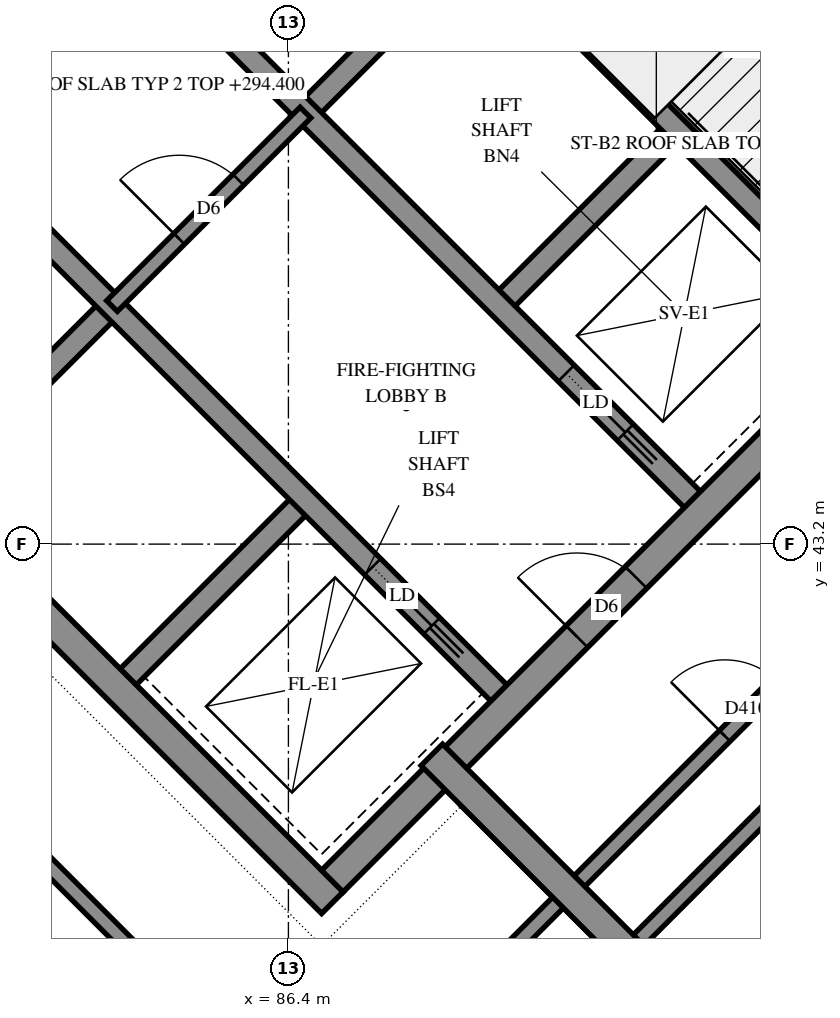
"""IFC4 building model, lengths in metres.
Left out: names, types, materials, properties, quantities, classifications, styles, units other than length and angle.
Written with IfcOpenShell. Run it as: python <this file> out.ifc"""

import sys

from ifc_helpers import new_model, si_unit, direction, frame, frame_2d, origin, place, context, subcontext, project, spatial, polyline, rectangle, outline, extrude, element, fill, save


model = new_model("IFC4")
c1 = context("Model", 3, precision=1e-05, world=origin(), true_north=direction((0.0, 1.0)))
c2 = subcontext(c1, "Body", "Model", "MODEL_VIEW")
j1 = project(units=[si_unit("LENGTHUNIT", "METRE"), si_unit("PLANEANGLEUNIT", "RADIAN")], contexts=[c1])
p1 = place(None, origin())
s1 = spatial("IfcSite", under=j1, at=p1, CompositionType="ELEMENT")
p2 = place(p1, origin())
s2 = spatial("IfcBuilding", under=s1, at=p2, CompositionType="ELEMENT")
p3 = place(p2, frame((0.0, 0.0, 294.4)))
s3 = spatial("IfcBuildingStorey", under=s2, at=p3, CompositionType="ELEMENT", Elevation=294.4)
p4 = place(p3, frame((76.23, 49.231, -0.3), z_axis=(0.0, 0.0, 1.0), x_axis=(0.7071034917, -0.7071100706, 0.0)))
e1 = element("IfcWall", 1, at=p4, inside=s3, PredefinedType="SHEAR", context=c2, shape_type="SweptSolid", body=[
    extrude(outline(polyline([(0.0, 0.0), (15.2, 0.0), (15.2, 3.1), (0.0, 3.1), (0.0, 0.0)])), frame((0.0, 0.2, 0.0), z_axis=(0.0, -1.0, 0.0), x_axis=(1.0, 0.0, 0.0)), (0.0, 0.0, 1.0), 0.4),
])
p5 = place(p3, frame((86.695, 59.696, -0.3), z_axis=(0.0, 0.0, 1.0), x_axis=(0.7071100706, -0.7071034917, 0.0)))
e2 = element("IfcWall", 2, at=p5, inside=s3, PredefinedType="SHEAR", context=c2, shape_type="SweptSolid", body=[
    extrude(outline(polyline([(0.0, 0.0), (15.2, 0.0), (15.2, 3.1), (0.0, 3.1), (0.0, 0.0)])), frame((0.0, 0.2, 0.0), z_axis=(0.0, -1.0, 0.0), x_axis=(1.0, 0.0, 0.0)), (0.0, 0.0, 1.0), 0.4),
])
p6 = place(p5, frame((10.4, 0.0, 0.3)))
e3 = element("IfcOpeningElement", 3, at=p6, cuts=e2, PredefinedType="OPENING", context=c2, shape_type="SweptSolid", body=[
    extrude(rectangle(XDim=0.8, YDim=2.1, at=frame_2d((0.4, 1.05))), frame((0.0, 0.21, 0.0), z_axis=(0.0, -1.0, 0.0), x_axis=(1.0, 0.0, 0.0)), (0.0, 0.0, 1.0), 0.42),
])
p7 = place(p3, frame((76.513, 49.231, -0.3), z_axis=(0.0, 0.0, 1.0), x_axis=(0.7071067812, 0.7071067812, 0.0)))
e4 = element("IfcWall", 4, at=p7, inside=s3, PredefinedType="SHEAR", context=c2, shape_type="SweptSolid", body=[
    extrude(outline(polyline([(0.0, 0.0), (14.4, 0.0), (14.4, 3.1), (0.0, 3.1), (0.0, 0.0)])), frame((0.0, 0.2, 0.0), z_axis=(0.0, -1.0, 0.0), x_axis=(1.0, 0.0, 0.0)), (0.0, 0.0, 1.0), 0.4),
])
p8 = place(p7, frame((4.55, 0.0, 0.3)))
e5 = element("IfcOpeningElement", 5, at=p8, cuts=e4, PredefinedType="OPENING", context=c2, shape_type="SweptSolid", body=[
    extrude(rectangle(XDim=1.1, YDim=2.1, at=frame_2d((0.55, 1.05))), frame((0.0, 0.21, 0.0), z_axis=(0.0, -1.0, 0.0), x_axis=(1.0, 0.0, 0.0)), (0.0, 0.0, 1.0), 0.42),
])
p9 = place(p7, frame((11.35, 0.0, 0.3)))
e6 = element("IfcOpeningElement", 6, at=p9, cuts=e4, PredefinedType="OPENING", context=c2, shape_type="SweptSolid", body=[
    extrude(rectangle(XDim=1.1, YDim=2.1, at=frame_2d((0.55, 1.05))), frame((0.0, 0.21, 0.0), z_axis=(0.0, -1.0, 0.0), x_axis=(1.0, 0.0, 0.0)), (0.0, 0.0, 1.0), 0.42),
])
p10 = place(p3, frame((86.978, 38.766, -0.3), z_axis=(0.0, 0.0, 1.0), x_axis=(0.7071067812, 0.7071067812, 0.0)))
e7 = element("IfcWall", 7, at=p10, inside=s3, PredefinedType="SHEAR", context=c2, shape_type="SweptSolid", body=[
    extrude(outline(polyline([(0.0, 0.0), (14.4, 0.0), (14.4, 3.1), (0.0, 3.1), (0.0, 0.0)])), frame((0.0, 0.2, 0.0), z_axis=(0.0, -1.0, 0.0), x_axis=(1.0, 0.0, 0.0)), (0.0, 0.0, 1.0), 0.4),
])
p11 = place(p10, frame((4.55, 0.0, 0.3)))
e8 = element("IfcOpeningElement", 8, at=p11, cuts=e7, PredefinedType="OPENING", context=c2, shape_type="SweptSolid", body=[
    extrude(rectangle(XDim=1.1, YDim=2.1, at=frame_2d((0.55, 1.05))), frame((0.0, 0.21, 0.0), z_axis=(0.0, -1.0, 0.0), x_axis=(1.0, 0.0, 0.0)), (0.0, 0.0, 1.0), 0.42),
])
p12 = place(p10, frame((11.35, 0.0, 0.3)))
e9 = element("IfcOpeningElement", 9, at=p12, cuts=e7, PredefinedType="OPENING", context=c2, shape_type="SweptSolid", body=[
    extrude(rectangle(XDim=1.1, YDim=2.1, at=frame_2d((0.55, 1.05))), frame((0.0, 0.21, 0.0), z_axis=(0.0, -1.0, 0.0), x_axis=(1.0, 0.0, 0.0)), (0.0, 0.0, 1.0), 0.42),
])
p13 = place(p3, frame((81.746, 43.999, 0.0), z_axis=(0.0, 0.0, 1.0), x_axis=(0.7071067812, 0.7071067812, 0.0)))
e10 = element("IfcWall", 10, at=p13, inside=s3, PredefinedType="SOLIDWALL", context=c2, shape_type="SweptSolid", body=[
    extrude(outline(polyline([(0.0, 0.0), (3.3, 0.0), (3.3, 3.5), (0.0, 3.5), (0.0, 0.0)])), frame((0.0, 0.15, 0.0), z_axis=(0.0, -1.0, 0.0), x_axis=(1.0, 0.0, 0.0)), (0.0, 0.0, 1.0), 0.3),
])
p14 = place(p3, frame((86.625, 48.878, 0.0), z_axis=(0.0, 0.0, 1.0), x_axis=(0.7071067812, 0.7071067812, 0.0)))
e11 = element("IfcWall", 11, at=p14, inside=s3, PredefinedType="SOLIDWALL", context=c2, shape_type="SweptSolid", body=[
    extrude(outline(polyline([(0.0, 0.0), (3.3, 0.0), (3.3, 3.5), (0.0, 3.5), (0.0, 0.0)])), frame((0.0, 0.15, 0.0), z_axis=(0.0, -1.0, 0.0), x_axis=(1.0, 0.0, 0.0)), (0.0, 0.0, 1.0), 0.3),
])
p15 = place(p3, frame((84.291, 41.453, 0.0), z_axis=(0.0, 0.0, 1.0), x_axis=(0.7071067812, 0.7071067812, 0.0)))
e12 = element("IfcWall", 12, at=p15, inside=s3, PredefinedType="SOLIDWALL", context=c2, shape_type="SweptSolid", body=[
    extrude(outline(polyline([(0.0, 0.0), (3.3, 0.0), (3.3, 3.5), (0.0, 3.5), (0.0, 0.0)])), frame((0.0, 0.15, 0.0), z_axis=(0.0, -1.0, 0.0), x_axis=(1.0, 0.0, 0.0)), (0.0, 0.0, 1.0), 0.3),
])
p16 = place(p3, frame((89.17, 46.332, 0.0), z_axis=(0.0, 0.0, 1.0), x_axis=(0.7071067812, 0.7071067812, 0.0)))
e13 = element("IfcWall", 13, at=p16, inside=s3, PredefinedType="SOLIDWALL", context=c2, shape_type="SweptSolid", body=[
    extrude(outline(polyline([(0.0, 0.0), (3.3, 0.0), (3.3, 3.5), (0.0, 3.5), (0.0, 0.0)])), frame((0.0, 0.15, 0.0), z_axis=(0.0, -1.0, 0.0), x_axis=(1.0, 0.0, 0.0)), (0.0, 0.0, 1.0), 0.3),
])
p17 = place(p3, frame((78.988, 51.423, 0.0), z_axis=(0.0, 0.0, 1.0), x_axis=(0.7071067812, -0.7071067812, 0.0)))
e14 = element("IfcWall", 14, at=p17, inside=s3, PredefinedType="SOLIDWALL", context=c2, shape_type="SweptSolid", body=[
    extrude(outline(polyline([(0.0, 0.0), (14.4, 0.0), (14.4, 3.5), (0.0, 3.5), (0.0, 0.0)])), frame((0.0, 0.15, 0.0), z_axis=(0.0, -1.0, 0.0), x_axis=(1.0, 0.0, 0.0)), (0.0, 0.0, 1.0), 0.3),
])
p18 = place(p17, frame((12.05, 0.0, 0.0)))
e15 = element("IfcOpeningElement", 15, at=p18, cuts=e14, PredefinedType="OPENING", context=c2, shape_type="SweptSolid", body=[
    extrude(rectangle(XDim=1.1, YDim=2.1, at=frame_2d((0.55, 1.05))), frame((0.0, 0.16, 0.0), z_axis=(0.0, -1.0, 0.0), x_axis=(1.0, 0.0, 0.0)), (0.0, 0.0, 1.0), 0.32),
])
p19 = place(p3, frame((81.534, 53.969, 0.0), z_axis=(0.0, 0.0, 1.0), x_axis=(0.707103309, -0.7071102534, 0.0)))
e16 = element("IfcWall", 16, at=p19, inside=s3, PredefinedType="SOLIDWALL", context=c2, shape_type="SweptSolid", body=[
    extrude(outline(polyline([(0.0, 0.0), (14.4, 0.0), (14.4, 3.5), (0.0, 3.5), (0.0, 0.0)])), frame((0.0, 0.15, 0.0), z_axis=(0.0, -1.0, 0.0), x_axis=(1.0, 0.0, 0.0)), (0.0, 0.0, 1.0), 0.3),
])
p20 = place(p19, frame((12.05, 0.0, 0.0)))
e17 = element("IfcOpeningElement", 17, at=p20, cuts=e16, PredefinedType="OPENING", context=c2, shape_type="SweptSolid", body=[
    extrude(rectangle(XDim=1.1, YDim=2.1, at=frame_2d((0.55, 1.05))), frame((0.0, 0.16, 0.0), z_axis=(0.0, -1.0, 0.0), x_axis=(1.0, 0.0, 0.0)), (0.0, 0.0, 1.0), 0.32),
])
p21 = place(p3, frame((88.958, 51.211, 0.0), z_axis=(0.0, 0.0, 1.0), x_axis=(0.7070998367, -0.7071137256, 0.0)))
e18 = element("IfcWall", 18, at=p21, inside=s3, PredefinedType="SOLIDWALL", context=c2, shape_type="SweptSolid", body=[
    extrude(outline(polyline([(0.0, 0.0), (7.2, 0.0), (7.2, 3.5), (0.0, 3.5), (0.0, 0.0)])), frame((0.0, 0.15, 0.0), z_axis=(0.0, -1.0, 0.0), x_axis=(1.0, 0.0, 0.0)), (0.0, 0.0, 1.0), 0.3),
])
p22 = place(p3, frame((89.382, 29.856, 0.0), z_axis=(0.0, 0.0, 1.0), x_axis=(0.7071094407, 0.7071041216, 0.0)))
e19 = element("IfcWall", 19, at=p22, inside=s3, PredefinedType="SOLIDWALL", context=c2, shape_type="SweptSolid", body=[
    extrude(outline(polyline([(-0.2, -0.2), (19.0, -0.2), (18.6, 0.2), (0.2, 0.2), (-0.2, -0.2)])), origin(), (0.0, 0.0, 1.0), 3.5),
])
p23 = place(p22, frame((1.9, 0.0, 0.7)))
e20 = element("IfcOpeningElement", 20, at=p23, cuts=e19, PredefinedType="OPENING", context=c2, shape_type="SweptSolid", body=[
    extrude(rectangle(XDim=1.8, YDim=2.2, at=frame_2d((0.9, 1.1))), frame((0.0, 0.21, 0.0), z_axis=(0.0, -1.0, 0.0), x_axis=(1.0, 0.0, 0.0)), (0.0, 0.0, 1.0), 0.42),
])
p24 = place(p22, frame((5.5, 0.0, 0.7)))
e21 = element("IfcOpeningElement", 21, at=p24, cuts=e19, PredefinedType="OPENING", context=c2, shape_type="SweptSolid", body=[
    extrude(rectangle(XDim=1.8, YDim=2.2, at=frame_2d((0.9, 1.1))), frame((0.0, 0.21, 0.0), z_axis=(0.0, -1.0, 0.0), x_axis=(1.0, 0.0, 0.0)), (0.0, 0.0, 1.0), 0.42),
])
p25 = place(p22, frame((8.8, 0.0, 0.7)))
e22 = element("IfcOpeningElement", 22, at=p25, cuts=e19, PredefinedType="OPENING", context=c2, shape_type="SweptSolid", body=[
    extrude(rectangle(XDim=1.8, YDim=2.2, at=frame_2d((0.9, 1.1))), frame((0.0, 0.21, 0.0), z_axis=(0.0, -1.0, 0.0), x_axis=(1.0, 0.0, 0.0)), (0.0, 0.0, 1.0), 0.42),
])
p26 = place(p22, frame((12.95, 0.0, 0.7)))
e23 = element("IfcOpeningElement", 23, at=p26, cuts=e19, PredefinedType="OPENING", context=c2, shape_type="SweptSolid", body=[
    extrude(rectangle(XDim=1.8, YDim=2.2, at=frame_2d((0.9, 1.1))), frame((0.0, 0.21, 0.0), z_axis=(0.0, -1.0, 0.0), x_axis=(1.0, 0.0, 0.0)), (0.0, 0.0, 1.0), 0.42),
])
p27 = place(p22, frame((16.0, 0.0, 0.7)))
e24 = element("IfcOpeningElement", 24, at=p27, cuts=e19, PredefinedType="OPENING", context=c2, shape_type="SweptSolid", body=[
    extrude(rectangle(XDim=1.8, YDim=2.2, at=frame_2d((0.9, 1.1))), frame((0.0, 0.21, 0.0), z_axis=(0.0, -1.0, 0.0), x_axis=(1.0, 0.0, 0.0)), (0.0, 0.0, 1.0), 0.42),
])
p28 = place(p3, frame((77.039, 42.2, 0.0), z_axis=(0.0, 0.0, 1.0), x_axis=(0.7071067812, -0.7071067812, 0.0)))
e25 = element("IfcWall", 25, at=p28, inside=s3, PredefinedType="SOLIDWALL", context=c2, shape_type="SweptSolid", body=[
    extrude(outline(polyline([(0.083, -0.2), (17.656, -0.2), (17.256, 0.2), (-0.083, 0.2), (0.083, -0.2)])), origin(), (0.0, 0.0, 1.0), 3.5),
])
p29 = place(p28, frame((2.857, 0.0, 0.7)))
e26 = element("IfcOpeningElement", 26, at=p29, cuts=e25, PredefinedType="OPENING", context=c2, shape_type="SweptSolid", body=[
    extrude(rectangle(XDim=1.8, YDim=2.2, at=frame_2d((0.9, 1.1))), frame((0.0, 0.21, 0.0), z_axis=(0.0, -1.0, 0.0), x_axis=(1.0, 0.0, 0.0)), (0.0, 0.0, 1.0), 0.42),
])
p30 = place(p28, frame((6.556, 0.0, 0.7)))
e27 = element("IfcOpeningElement", 27, at=p30, cuts=e25, PredefinedType="OPENING", context=c2, shape_type="SweptSolid", body=[
    extrude(rectangle(XDim=1.8, YDim=2.2, at=frame_2d((0.9, 1.1))), frame((0.0, 0.21, 0.0), z_axis=(0.0, -1.0, 0.0), x_axis=(1.0, 0.0, 0.0)), (0.0, 0.0, 1.0), 0.42),
])
p31 = place(p28, frame((10.156, 0.0, 0.7)))
e28 = element("IfcOpeningElement", 28, at=p31, cuts=e25, PredefinedType="OPENING", context=c2, shape_type="SweptSolid", body=[
    extrude(rectangle(XDim=1.8, YDim=2.2, at=frame_2d((0.9, 1.1))), frame((0.0, 0.21, 0.0), z_axis=(0.0, -1.0, 0.0), x_axis=(1.0, 0.0, 0.0)), (0.0, 0.0, 1.0), 0.42),
])
p32 = place(p28, frame((13.757, 0.0, 0.7)))
e29 = element("IfcOpeningElement", 29, at=p32, cuts=e25, PredefinedType="OPENING", context=c2, shape_type="SweptSolid", body=[
    extrude(rectangle(XDim=1.8, YDim=2.2, at=frame_2d((0.9, 1.1))), frame((0.0, 0.21, 0.0), z_axis=(0.0, -1.0, 0.0), x_axis=(1.0, 0.0, 0.0)), (0.0, 0.0, 1.0), 0.42),
])
p33 = place(p3, frame((93.908, 34.665, 0.0), z_axis=(0.0, 0.0, 1.0), x_axis=(-0.7071067812, 0.7071067812, 0.0)))
e30 = element("IfcWall", 30, at=p33, inside=s3, PredefinedType="PARAPET", context=c2, shape_type="SweptSolid", body=[
    extrude(outline(polyline([(0.0, -0.1), (7.3, -0.1), (7.3, 0.1), (0.0, 0.1), (0.0, -0.1)])), origin(), (0.0, 0.0, 1.0), 0.25),
])
p34 = place(p3, frame((91.313, 53.354, 0.0), z_axis=(0.0, 0.0, 1.0), x_axis=(0.7071067812, -0.7071067812, 0.0)))
e31 = element("IfcWall", 31, at=p34, inside=s3, PredefinedType="PARTITIONING", context=c2, shape_type="SweptSolid", body=[
    extrude(outline(polyline([(0.0, 0.0), (5.65, 0.0), (5.65, 3.5), (0.0, 3.5), (0.0, 0.0)])), frame((0.0, 0.075, 0.0), z_axis=(0.0, -1.0, 0.0), x_axis=(1.0, 0.0, 0.0)), (0.0, 0.0, 1.0), 0.15),
])
p35 = place(p3, frame((84.079, 46.332, 0.0), z_axis=(0.0, 0.0, 1.0), x_axis=(0.7071067812, 0.7071067812, 0.0)))
e32 = element("IfcWall", 32, at=p35, inside=s3, PredefinedType="PARTITIONING", context=c2, shape_type="SweptSolid", body=[
    extrude(outline(polyline([(0.0, 0.0), (3.6, 0.0), (3.6, 3.5), (0.0, 3.5), (0.0, 0.0)])), frame((0.0, 0.1, 0.0), z_axis=(0.0, -1.0, 0.0), x_axis=(1.0, 0.0, 0.0)), (0.0, 0.0, 1.0), 0.2),
])
p36 = place(p35, frame((1.25, 0.0, 0.0)))
e33 = element("IfcOpeningElement", 33, at=p36, cuts=e32, PredefinedType="OPENING", context=c2, shape_type="SweptSolid", body=[
    extrude(rectangle(XDim=1.1, YDim=2.1, at=frame_2d((0.55, 1.05))), frame((0.0, 0.11, 0.0), z_axis=(0.0, -1.0, 0.0), x_axis=(1.0, 0.0, 0.0)), (0.0, 0.0, 1.0), 0.22),
])
p37 = place(p3, frame((86.836, 35.372, 0.0), z_axis=(0.0, 0.0, 1.0), x_axis=(0.7071067812, 0.7071067812, 0.0)))
e34 = element("IfcWall", 34, at=p37, inside=s3, PredefinedType="PARTITIONING", context=c2, shape_type="SweptSolid", body=[
    extrude(rectangle(XDim=8.651, YDim=0.2, at=frame_2d((4.325, 0.0))), origin(), (0.0, 0.0, 1.0), 3.5),
])
p38 = place(p37, frame((7.502, 0.0, 0.0)))
e35 = element("IfcOpeningElement", 35, at=p38, cuts=e34, PredefinedType="OPENING", context=c2, shape_type="SweptSolid", body=[
    extrude(rectangle(XDim=1.0, YDim=2.1, at=frame_2d((0.5, 1.05))), frame((0.0, 0.11, 0.0), z_axis=(0.0, -1.0, 0.0), x_axis=(1.0, 0.0, 0.0)), (0.0, 0.0, 1.0), 0.22),
])
p39 = place(p3, frame((89.876, 36.858, 0.0), z_axis=(0.0, 0.0, 1.0), x_axis=(0.7071067812, 0.7071067812, 0.0)))
e36 = element("IfcWall", 36, at=p39, inside=s3, PredefinedType="PARTITIONING", context=c2, shape_type="SweptSolid", body=[
    extrude(rectangle(XDim=5.45, YDim=0.2, at=frame_2d((2.725, 0.0))), origin(), (0.0, 0.0, 1.0), 3.5),
])
p40 = place(p3, frame((82.526, 39.688, 0.0), z_axis=(0.0, 0.0, 1.0), x_axis=(0.7068288851, -0.7073845681, 0.0)))
e37 = element("IfcWall", 37, at=p40, inside=s3, PredefinedType="PARTITIONING", context=c2, shape_type="SweptSolid", body=[
    extrude(rectangle(XDim=3.599, YDim=0.2, at=frame_2d((1.8, 0.0))), origin(), (0.0, 0.0, 1.0), 3.5),
])
p41 = place(p11, origin())
e38 = element("IfcDoor", 38, at=p41, inside=s3, OperationType="DOUBLE_DOOR_SINGLE_SWING", PredefinedType="DOOR", context=c2, shape_type="SweptSolid", body=[
    extrude(rectangle(XDim=1.1, YDim=2.1, at=frame_2d((0.55, 1.05))), frame((0.0, 0.025, 0.0), z_axis=(0.0, -1.0, 0.0), x_axis=(1.0, 0.0, 0.0)), (0.0, 0.0, 1.0), 0.05),
])
fill(e8, e38)
p42 = place(p36, origin())
e39 = element("IfcDoor", 39, at=p42, inside=s3, OperationType="DOUBLE_DOOR_SINGLE_SWING", PredefinedType="DOOR", context=c2, shape_type="SweptSolid", body=[
    extrude(rectangle(XDim=1.1, YDim=2.1, at=frame_2d((0.55, 1.05))), frame((0.0, 0.025, 0.0), z_axis=(0.0, -1.0, 0.0), x_axis=(1.0, 0.0, 0.0)), (0.0, 0.0, 1.0), 0.05),
])
fill(e33, e39)
p43 = place(p18, origin())
e40 = element("IfcDoor", 40, at=p43, inside=s3, OperationType="SLIDING_TO_RIGHT", PredefinedType="DOOR", context=c2, shape_type="SweptSolid", body=[
    extrude(rectangle(XDim=1.1, YDim=2.1, at=frame_2d((0.55, 1.05))), frame((0.0, 0.025, 0.0), z_axis=(0.0, -1.0, 0.0), x_axis=(1.0, 0.0, 0.0)), (0.0, 0.0, 1.0), 0.05),
])
fill(e15, e40)
p44 = place(p20, origin())
e41 = element("IfcDoor", 41, at=p44, inside=s3, OperationType="SLIDING_TO_RIGHT", PredefinedType="DOOR", context=c2, shape_type="SweptSolid", body=[
    extrude(rectangle(XDim=1.1, YDim=2.1, at=frame_2d((0.55, 1.05))), frame((0.0, 0.025, 0.0), z_axis=(0.0, -1.0, 0.0), x_axis=(1.0, 0.0, 0.0)), (0.0, 0.0, 1.0), 0.05),
])
fill(e17, e41)
p45 = place(p38, origin())
e42 = element("IfcDoor", 42, at=p45, inside=s3, OperationType="SINGLE_SWING_LEFT", PredefinedType="DOOR", context=c2, shape_type="SweptSolid", body=[
    extrude(rectangle(XDim=1.0, YDim=2.1, at=frame_2d((0.5, 1.05))), frame((0.0, 0.025, 0.0), z_axis=(0.0, -1.0, 0.0), x_axis=(1.0, 0.0, 0.0)), (0.0, 0.0, 1.0), 0.05),
])
fill(e35, e42)
save(model, sys.argv[1])
